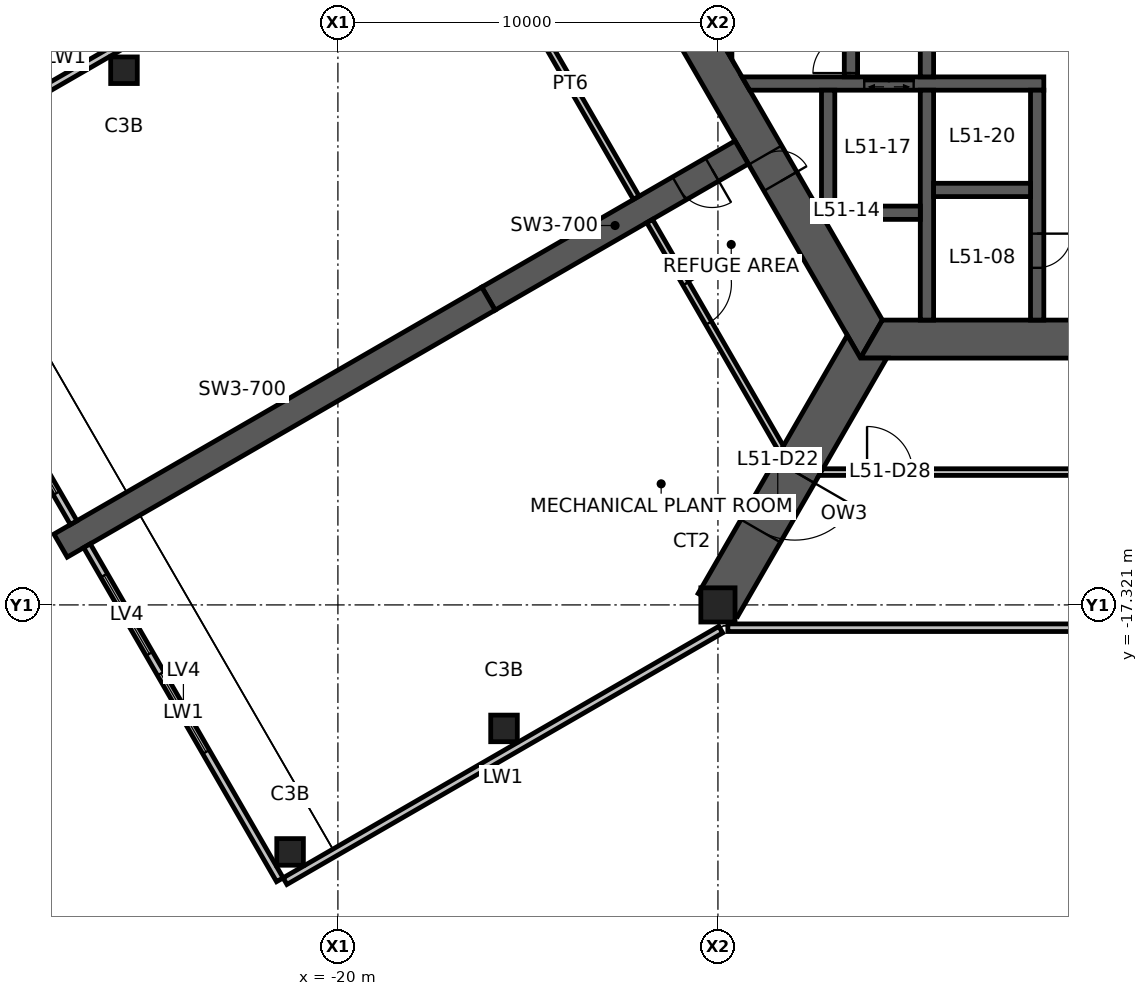
"""IFC4 building model, lengths in metres.
Left out: names, types, materials, properties, quantities, classifications, styles, units other than length and angle.
Written with IfcOpenShell. Run it as: python <this file> out.ifc"""

import sys

from ifc_helpers import new_model, si_unit, direction, frame, frame_2d, origin, origin_2d, place, context, subcontext, project, spatial, polyline, rectangle, hollow_rectangle, outline, extrude, element, fill, save


model = new_model("IFC4")
c1 = context("Model", 3, precision=1e-05, world=origin(), true_north=direction((0.0, 1.0)))
c2 = subcontext(c1, "Body", "Model", "MODEL_VIEW")
j1 = project(units=[si_unit("LENGTHUNIT", "METRE"), si_unit("PLANEANGLEUNIT", "RADIAN")], contexts=[c1])
p1 = place(None, origin())
s1 = spatial("IfcSite", under=j1, at=p1, CompositionType="ELEMENT")
p2 = place(p1, origin())
s2 = spatial("IfcBuilding", under=s1, at=p2, CompositionType="ELEMENT")
p3 = place(p2, frame((0.0, 0.0, 203.3)))
s3 = spatial("IfcBuildingStorey", under=s2, at=p3, CompositionType="ELEMENT", Elevation=203.3)
p4 = place(p3, frame((-10.0, -17.321, 0.0), z_axis=(0.0, 0.0, 1.0), x_axis=(1.0, 0.0, 0.0)))
e1 = element("IfcColumn", 1, at=p4, inside=s3, PredefinedType="COLUMN", context=c2, shape_type="SweptSolid", body=[
    extrude(hollow_rectangle(XDim=0.9, YDim=0.9, WallThickness=0.09, at=origin_2d()), origin(), (0.0, 0.0, 1.0), 5.0),
])
for number, where, z_axis, x_axis in (
    (2, (-25.629, -3.25, 0.0), (0.0, 0.0, 1.0), (1.0, 0.0, 0.0)),
    (3, (-15.629, -20.571, 0.0), (0.0, 0.0, 1.0), (1.0, 0.0, 0.0)),
    (4, (-21.258, -23.821, 0.0), (0.0, 0.0, 1.0), (1.0, 0.0, 0.0)),
):
    element("IfcColumn", number, at=place(p3, frame(where, z_axis=z_axis, x_axis=x_axis)), inside=s3, PredefinedType="COLUMN", context=c2, shape_type="SweptSolid", body=[
        extrude(hollow_rectangle(XDim=0.7, YDim=0.7, WallThickness=0.036, at=origin_2d()), origin(), (0.0, 0.0, 1.0), 5.0),
    ])
p5 = place(p3, frame((-11.922, 0.0, 0.0), z_axis=(0.0, 0.0, 1.0), x_axis=(0.500004296715, -0.866022923061, 0.0)))
e5 = element("IfcWall", 5, at=p5, inside=s3, PredefinedType="SHEAR", context=c2, shape_type="SweptSolid", body=[
    extrude(outline(polyline([(-0.289, -0.5), (6.331, -0.5), (7.131, -0.5), (12.211, -0.5), (11.634, 0.5), (7.131, 0.5), (6.331, 0.5), (0.289, 0.5), (-0.289, -0.5)])), origin(), (0.0, 0.0, 1.0), 5.0),
])
p6 = place(p5, frame((6.331, 0.0, 0.0)))
e6 = element("IfcOpeningElement", 6, at=p6, cuts=e5, PredefinedType="OPENING", context=c2, shape_type="SweptSolid", body=[
    extrude(rectangle(XDim=0.8, YDim=2.1, at=frame_2d((0.4, 1.05))), frame((0.0, 0.51, 0.0), z_axis=(0.0, -1.0, 0.0), x_axis=(1.0, 0.0, 0.0)), (0.0, 0.0, 1.0), 1.02),
])
p7 = place(p3, frame((-5.961, -10.325, 0.0), z_axis=(0.0, 0.0, 1.0), x_axis=(1.0, 0.0, 0.0)))
e7 = element("IfcWall", 7, at=p7, inside=s3, PredefinedType="SHEAR", context=c2, shape_type="SweptSolid", body=[
    extrude(outline(polyline([(-0.289, -0.5), (5.461, -0.5), (6.461, -0.5), (12.211, -0.5), (11.634, 0.5), (6.461, 0.5), (5.461, 0.5), (0.289, 0.5), (-0.289, -0.5)])), origin(), (0.0, 0.0, 1.0), 5.0),
])
p8 = place(p7, frame((5.461, 0.0, 0.0)))
e8 = element("IfcOpeningElement", 8, at=p8, cuts=e7, PredefinedType="OPENING", context=c2, shape_type="SweptSolid", body=[
    extrude(rectangle(XDim=1.0, YDim=2.1, at=frame_2d((0.5, 1.05))), frame((0.0, 0.51, 0.0), z_axis=(0.0, -1.0, 0.0), x_axis=(1.0, 0.0, 0.0)), (0.0, 0.0, 1.0), 1.02),
])
p9 = place(p3, frame((-9.375, -5.413, 0.0), z_axis=(0.0, 0.0, 1.0), x_axis=(-0.866032377459, -0.499987921047, 0.0)))
e9 = element("IfcWall", 9, at=p9, inside=s3, PredefinedType="SHEAR", context=c2, shape_type="SweptSolid", body=[
    extrude(rectangle(XDim=7.696, YDim=0.7, at=frame_2d((3.848, 0.0))), origin(), (0.0, 0.0, 1.0), 5.0),
])
p10 = place(p9, frame((0.9, 0.0, 0.0)))
e10 = element("IfcOpeningElement", 10, at=p10, cuts=e9, PredefinedType="OPENING", context=c2, shape_type="SweptSolid", body=[
    extrude(rectangle(XDim=1.0, YDim=2.1, at=frame_2d((0.5, 1.05))), frame((0.0, 0.36, 0.0), z_axis=(0.0, -1.0, 0.0), x_axis=(1.0, 0.0, 0.0)), (0.0, 0.0, 1.0), 0.72),
])
p11 = place(p3, frame((-16.039, -9.26, 0.0), z_axis=(0.0, 0.0, 1.0), x_axis=(-0.866024837091, -0.50000098154, 0.0)))
e11 = element("IfcWall", 11, at=p11, inside=s3, PredefinedType="SHEAR", context=c2, shape_type="SweptSolid", body=[
    extrude(rectangle(XDim=13.0, YDim=0.7, at=frame_2d((6.5, 0.0))), origin(), (0.0, 0.0, 1.0), 5.0),
])
p12 = place(p3, frame((-6.25, -10.825, -1.15), z_axis=(0.0, 0.0, 1.0), x_axis=(-0.50000045744, -0.866025139681, 0.0)))
e12 = element("IfcWall", 12, at=p12, inside=s3, PredefinedType="SHEAR", context=c2, shape_type="SweptSolid", body=[
    extrude(outline(polyline([(-0.346, -0.6), (3.453, -0.6), (5.253, -0.6), (7.5, -0.6), (7.5, 0.6), (5.253, 0.6), (3.453, 0.6), (-0.346, 0.6), (0.0, 0.0), (-0.346, -0.6)])), origin(), (0.0, 0.0, 1.0), 6.15),
])
p13 = place(p12, frame((3.453, 0.0, 1.15)))
e13 = element("IfcOpeningElement", 13, at=p13, cuts=e12, PredefinedType="OPENING", context=c2, shape_type="SweptSolid", body=[
    extrude(rectangle(XDim=1.8, YDim=2.4, at=frame_2d((0.9, 1.2))), frame((0.0, 0.61, 0.0), z_axis=(0.0, -1.0, 0.0), x_axis=(1.0, 0.0, 0.0)), (0.0, 0.0, 1.0), 1.22),
])
p14 = place(p3, frame((-9.739, -17.92, 0.0), z_axis=(0.0, 0.0, 1.0), x_axis=(1.0, 0.0, 0.0)))
e14 = element("IfcWall", 14, at=p14, inside=s3, PredefinedType="ELEMENTEDWALL", context=c2, shape_type="SweptSolid", body=[
    extrude(rectangle(XDim=19.479, YDim=0.2, at=frame_2d((9.739, 0.0))), origin(), (0.0, 0.0, 1.0), 5.0),
])
p15 = place(p3, frame((-20.526, 0.389, 0.0), z_axis=(0.0, 0.0, 1.0), x_axis=(-0.86602620781, -0.499998607384, 0.0)))
e15 = element("IfcWall", 15, at=p15, inside=s3, PredefinedType="ELEMENTEDWALL", context=c2, shape_type="SweptSolid", body=[
    extrude(rectangle(XDim=13.239, YDim=0.2, at=frame_2d((6.62, 0.0))), origin(), (0.0, 0.0, 1.0), 5.0),
])
p16 = place(p3, frame((-32.028, -6.367, 0.0), z_axis=(0.0, 0.0, 1.0), x_axis=(0.499991044257, -0.866030574324, 0.0)))
e16 = element("IfcWall", 16, at=p16, inside=s3, PredefinedType="ELEMENTEDWALL", context=c2, shape_type="SweptSolid", body=[
    extrude(rectangle(XDim=10.15, YDim=0.2, at=frame_2d((5.075, 0.0))), origin(), (0.0, 0.0, 1.0), 5.0),
])
p17 = place(p16, frame((3.883, 0.0, 0.6)))
e17 = element("IfcOpeningElement", 17, at=p17, cuts=e16, PredefinedType="OPENING", context=c2, shape_type="SweptSolid", body=[
    extrude(rectangle(XDim=2.383, YDim=3.6, at=frame_2d((1.192, 1.8))), frame((0.0, 0.11, 0.0), z_axis=(0.0, -1.0, 0.0), x_axis=(1.0, 0.0, 0.0)), (0.0, 0.0, 1.0), 0.22),
])
p18 = place(p16, frame((6.867, 0.0, 0.6)))
e18 = element("IfcOpeningElement", 18, at=p18, cuts=e16, PredefinedType="OPENING", context=c2, shape_type="SweptSolid", body=[
    extrude(rectangle(XDim=2.383, YDim=3.6, at=frame_2d((1.192, 1.8))), frame((0.0, 0.11, 0.0), z_axis=(0.0, -1.0, 0.0), x_axis=(1.0, 0.0, 0.0)), (0.0, 0.0, 1.0), 0.22),
])
p19 = place(p3, frame((-26.603, -15.763, 0.0), z_axis=(0.0, 0.0, 1.0), x_axis=(0.500019499409, -0.866014145503, 0.0)))
e19 = element("IfcWall", 19, at=p19, inside=s3, PredefinedType="ELEMENTEDWALL", context=c2, shape_type="SweptSolid", body=[
    extrude(rectangle(XDim=10.15, YDim=0.2, at=frame_2d((5.075, 0.0))), origin(), (0.0, 0.0, 1.0), 5.0),
])
p20 = place(p19, frame((0.9, 0.0, 0.6)))
e20 = element("IfcOpeningElement", 20, at=p20, cuts=e19, PredefinedType="OPENING", context=c2, shape_type="SweptSolid", body=[
    extrude(rectangle(XDim=2.383, YDim=3.6, at=frame_2d((1.192, 1.8))), frame((0.0, 0.11, 0.0), z_axis=(0.0, -1.0, 0.0), x_axis=(1.0, 0.0, 0.0)), (0.0, 0.0, 1.0), 0.22),
])
p21 = place(p19, frame((3.883, 0.0, 0.6)))
e21 = element("IfcOpeningElement", 21, at=p21, cuts=e19, PredefinedType="OPENING", context=c2, shape_type="SweptSolid", body=[
    extrude(rectangle(XDim=2.383, YDim=3.6, at=frame_2d((1.192, 1.8))), frame((0.0, 0.11, 0.0), z_axis=(0.0, -1.0, 0.0), x_axis=(1.0, 0.0, 0.0)), (0.0, 0.0, 1.0), 0.22),
])
p22 = place(p3, frame((-21.391, -24.59, 0.0), z_axis=(0.0, 0.0, 1.0), x_axis=(0.86602620781, 0.499998607384, 0.0)))
e22 = element("IfcWall", 22, at=p22, inside=s3, PredefinedType="ELEMENTEDWALL", context=c2, shape_type="SweptSolid", body=[
    extrude(rectangle(XDim=13.239, YDim=0.2, at=frame_2d((6.62, 0.0))), origin(), (0.0, 0.0, 1.0), 5.0),
])
p23 = place(p3, frame((-9.266, -3.6, 0.0), z_axis=(0.0, 0.0, 1.0), x_axis=(1.0, 0.0, 0.0)))
e23 = element("IfcWall", 23, at=p23, inside=s3, PredefinedType="SHEAR", context=c2, shape_type="SweptSolid", body=[
    extrude(outline(polyline([(0.101, -0.175), (3.116, -0.175), (4.417, -0.175), (7.841, -0.175), (7.841, 0.175), (4.417, 0.175), (3.116, 0.175), (-0.101, 0.175), (0.101, -0.175)])), origin(), (0.0, 0.0, 1.0), 5.0),
])
p24 = place(p23, frame((3.116, 0.0, 0.0)))
e24 = element("IfcOpeningElement", 24, at=p24, cuts=e23, PredefinedType="OPENING", context=c2, shape_type="SweptSolid", body=[
    extrude(rectangle(XDim=1.3, YDim=2.1, at=frame_2d((0.65, 1.05))), frame((0.0, 0.185, 0.0), z_axis=(0.0, -1.0, 0.0), x_axis=(1.0, 0.0, 0.0)), (0.0, 0.0, 1.0), 0.37),
])
p25 = place(p3, frame((-1.6, -3.775, 0.0), z_axis=(0.0, 0.0, 1.0), x_axis=(0.0, -1.0, 0.0)))
e25 = element("IfcWall", 25, at=p25, inside=s3, PredefinedType="SHEAR", context=c2, shape_type="SweptSolid", body=[
    extrude(rectangle(XDim=6.05, YDim=0.35, at=frame_2d((3.025, 0.0))), origin(), (0.0, 0.0, 1.0), 5.0),
])
p26 = place(p25, frame((3.775, 0.0, 0.0)))
e26 = element("IfcOpeningElement", 26, at=p26, cuts=e25, PredefinedType="OPENING", context=c2, shape_type="SweptSolid", body=[
    extrude(rectangle(XDim=0.9, YDim=2.1, at=frame_2d((0.45, 1.05))), frame((0.0, 0.185, 0.0), z_axis=(0.0, -1.0, 0.0), x_axis=(1.0, 0.0, 0.0)), (0.0, 0.0, 1.0), 0.37),
])
p27 = place(p3, frame((-4.5, -3.425, 0.0), z_axis=(0.0, 0.0, 1.0), x_axis=(0.0, 1.0, 0.0)))
e27 = element("IfcWall", 27, at=p27, inside=s3, PredefinedType="SHEAR", context=c2, shape_type="SweptSolid", body=[
    extrude(rectangle(XDim=6.85, YDim=0.35, at=frame_2d((3.425, 0.0))), origin(), (0.0, 0.0, 1.0), 5.0),
])
p28 = place(p27, frame((2.925, 0.0, 0.0)))
e28 = element("IfcOpeningElement", 28, at=p28, cuts=e27, PredefinedType="OPENING", context=c2, shape_type="SweptSolid", body=[
    extrude(rectangle(XDim=1.0, YDim=2.1, at=frame_2d((0.5, 1.05))), frame((0.0, 0.185, 0.0), z_axis=(0.0, -1.0, 0.0), x_axis=(1.0, 0.0, 0.0)), (0.0, 0.0, 1.0), 0.37),
])
p29 = place(p3, frame((-6.5, -3.425, 0.0), z_axis=(0.0, 0.0, 1.0), x_axis=(0.0, 1.0, 0.0)))
e29 = element("IfcWall", 29, at=p29, inside=s3, PredefinedType="SHEAR", context=c2, shape_type="SweptSolid", body=[
    extrude(rectangle(XDim=6.85, YDim=0.35, at=frame_2d((3.425, 0.0))), origin(), (0.0, 0.0, 1.0), 5.0),
])
p30 = place(p29, frame((0.1, 0.0, 0.0)))
e30 = element("IfcOpeningElement", 30, at=p30, cuts=e29, PredefinedType="OPENING", context=c2, shape_type="SweptSolid", body=[
    extrude(rectangle(XDim=1.0, YDim=2.1, at=frame_2d((0.5, 1.05))), frame((0.0, 0.185, 0.0), z_axis=(0.0, -1.0, 0.0), x_axis=(1.0, 0.0, 0.0)), (0.0, 0.0, 1.0), 0.37),
])
p31 = place(p3, frame((-4.5, -3.775, 0.0), z_axis=(0.0, 0.0, 1.0), x_axis=(0.0, -1.0, 0.0)))
e31 = element("IfcWall", 31, at=p31, inside=s3, PredefinedType="SHEAR", context=c2, shape_type="SweptSolid", body=[
    extrude(rectangle(XDim=6.05, YDim=0.35, at=frame_2d((3.025, 0.0))), origin(), (0.0, 0.0, 1.0), 5.0),
])
p32 = place(p3, frame((-4.325, -6.4, 0.0), z_axis=(0.0, 0.0, 1.0), x_axis=(1.0, 0.0, 0.0)))
e32 = element("IfcWall", 32, at=p32, inside=s3, PredefinedType="SHEAR", context=c2, shape_type="SweptSolid", body=[
    extrude(rectangle(XDim=2.55, YDim=0.35, at=frame_2d((1.275, 0.0))), origin(), (0.0, 0.0, 1.0), 5.0),
])
p33 = place(p3, frame((-6.925, -7.0, 0.0), z_axis=(0.0, 0.0, 1.0), x_axis=(1.0, 0.0, 0.0)))
e33 = element("IfcWall", 33, at=p33, inside=s3, PredefinedType="SHEAR", context=c2, shape_type="SweptSolid", body=[
    extrude(rectangle(XDim=2.25, YDim=0.35, at=frame_2d((1.125, 0.0))), origin(), (0.0, 0.0, 1.0), 5.0),
])
p34 = place(p3, frame((-7.1, -3.775, 0.0), z_axis=(0.0, 0.0, 1.0), x_axis=(0.0, -1.0, 0.0)))
e34 = element("IfcWall", 34, at=p34, inside=s3, PredefinedType="SHEAR", context=c2, shape_type="SweptSolid", body=[
    extrude(outline(polyline([(0.0, -0.175), (3.274, -0.175), (3.4, 0.0), (3.4, 0.175), (0.0, 0.175), (0.0, -0.175)])), origin(), (0.0, 0.0, 1.0), 5.0),
])
p35 = place(p3, frame((-9.808, -2.662, 0.0), z_axis=(0.0, 0.0, 1.0), x_axis=(0.0, 1.0, 0.0)))
e35 = element("IfcWall", 35, at=p35, inside=s3, PredefinedType="SHEAR", context=c2, shape_type="SweptSolid", body=[
    extrude(outline(polyline([(-0.303, -0.175), (5.628, -0.175), (5.021, 0.175), (0.303, 0.175), (-0.303, -0.175)])), origin(), (0.0, 0.0, 1.0), 5.0),
])
p36 = place(p3, frame((-15.617, -0.6, 0.0), z_axis=(0.0, 0.0, 1.0), x_axis=(0.499986605379, -0.866033137035, 0.0)))
e36 = element("IfcWall", 36, at=p36, inside=s3, PredefinedType="PARTITIONING", context=c2, shape_type="SweptSolid", body=[
    extrude(outline(polyline([(-0.051, -0.087), (6.934, -0.087), (6.934, 0.087), (0.051, 0.087), (-0.051, -0.087)])), origin(), (0.0, 0.0, 1.0), 4.8),
])
p37 = place(p3, frame((-11.795, -7.22, 0.0), z_axis=(0.0, 0.0, 1.0), x_axis=(0.49999776677, -0.866026693137, 0.0)))
e37 = element("IfcWall", 37, at=p37, inside=s3, PredefinedType="PARTITIONING", context=c2, shape_type="SweptSolid", body=[
    extrude(outline(polyline([(0.0, -0.087), (1.9, -0.087), (3.1, -0.087), (6.985, -0.087), (6.884, 0.087), (3.1, 0.087), (1.9, 0.087), (0.0, 0.087), (0.0, -0.087)])), origin(), (0.0, 0.0, 1.0), 4.8),
])
p38 = place(p37, frame((1.9, 0.0, 0.0)))
e38 = element("IfcOpeningElement", 38, at=p38, cuts=e37, PredefinedType="OPENING", context=c2, shape_type="SweptSolid", body=[
    extrude(rectangle(XDim=1.2, YDim=2.1, at=frame_2d((0.6, 1.05))), frame((0.0, 0.098, 0.0), z_axis=(0.0, -1.0, 0.0), x_axis=(1.0, 0.0, 0.0)), (0.0, 0.0, 1.0), 0.195),
])
p39 = place(p3, frame((-7.289, -13.825, 0.0), z_axis=(0.0, 0.0, 1.0), x_axis=(1.0, 0.0, 0.0)))
e39 = element("IfcWall", 39, at=p39, inside=s3, PredefinedType="PARTITIONING", context=c2, shape_type="SweptSolid", body=[
    extrude(outline(polyline([(-0.051, -0.087), (1.213, -0.087), (2.413, -0.087), (14.629, -0.087), (14.528, 0.087), (2.413, 0.087), (1.213, 0.087), (0.051, 0.087), (-0.051, -0.087)])), origin(), (0.0, 0.0, 1.0), 4.8),
])
p40 = place(p39, frame((1.213, 0.0, 0.0)))
e40 = element("IfcOpeningElement", 40, at=p40, cuts=e39, PredefinedType="OPENING", context=c2, shape_type="SweptSolid", body=[
    extrude(rectangle(XDim=1.2, YDim=2.1, at=frame_2d((0.6, 1.05))), frame((0.0, 0.098, 0.0), z_axis=(0.0, -1.0, 0.0), x_axis=(1.0, 0.0, 0.0)), (0.0, 0.0, 1.0), 0.195),
])
p41 = place(p18, origin())
e41 = element("IfcWindow", 41, at=p41, inside=s3, PartitioningType="SINGLE_PANEL", PredefinedType="USERDEFINED", context=c2, shape_type="SweptSolid", body=[
    extrude(rectangle(XDim=2.383, YDim=3.6, at=frame_2d((1.192, 1.8))), frame((0.0, 0.03, 0.0), z_axis=(0.0, -1.0, 0.0), x_axis=(1.0, 0.0, 0.0)), (0.0, 0.0, 1.0), 0.06),
])
fill(e18, e41)
p42 = place(p20, origin())
e42 = element("IfcWindow", 42, at=p42, inside=s3, PartitioningType="SINGLE_PANEL", PredefinedType="USERDEFINED", context=c2, shape_type="SweptSolid", body=[
    extrude(rectangle(XDim=2.383, YDim=3.6, at=frame_2d((1.192, 1.8))), frame((0.0, 0.03, 0.0), z_axis=(0.0, -1.0, 0.0), x_axis=(1.0, 0.0, 0.0)), (0.0, 0.0, 1.0), 0.06),
])
fill(e20, e42)
p43 = place(p21, origin())
e43 = element("IfcWindow", 43, at=p43, inside=s3, PartitioningType="SINGLE_PANEL", PredefinedType="USERDEFINED", context=c2, shape_type="SweptSolid", body=[
    extrude(rectangle(XDim=2.383, YDim=3.6, at=frame_2d((1.192, 1.8))), frame((0.0, 0.03, 0.0), z_axis=(0.0, -1.0, 0.0), x_axis=(1.0, 0.0, 0.0)), (0.0, 0.0, 1.0), 0.06),
])
fill(e21, e43)
p44 = place(p6, origin())
e44 = element("IfcDoor", 44, at=p44, inside=s3, OperationType="SINGLE_SWING_RIGHT", PredefinedType="DOOR", context=c2, shape_type="SweptSolid", body=[
    extrude(rectangle(XDim=0.8, YDim=2.1, at=frame_2d((0.4, 1.05))), frame((0.0, 0.025, 0.0), z_axis=(0.0, -1.0, 0.0), x_axis=(1.0, 0.0, 0.0)), (0.0, 0.0, 1.0), 0.05),
])
fill(e6, e44)
p45 = place(p30, origin())
e45 = element("IfcDoor", 45, at=p45, inside=s3, OperationType="SINGLE_SWING_LEFT", PredefinedType="DOOR", context=c2, shape_type="SweptSolid", body=[
    extrude(rectangle(XDim=1.0, YDim=2.1, at=frame_2d((0.5, 1.05))), frame((0.0, 0.025, 0.0), z_axis=(0.0, -1.0, 0.0), x_axis=(1.0, 0.0, 0.0)), (0.0, 0.0, 1.0), 0.05),
])
fill(e30, e45)
p46 = place(p26, origin())
e46 = element("IfcDoor", 46, at=p46, inside=s3, OperationType="SINGLE_SWING_LEFT", PredefinedType="DOOR", context=c2, shape_type="SweptSolid", body=[
    extrude(rectangle(XDim=0.9, YDim=2.1, at=frame_2d((0.45, 1.05))), frame((0.0, 0.025, 0.0), z_axis=(0.0, -1.0, 0.0), x_axis=(1.0, 0.0, 0.0)), (0.0, 0.0, 1.0), 0.05),
])
fill(e26, e46)
p47 = place(p10, origin())
e47 = element("IfcDoor", 47, at=p47, inside=s3, OperationType="SINGLE_SWING_LEFT", PredefinedType="DOOR", context=c2, shape_type="SweptSolid", body=[
    extrude(rectangle(XDim=1.0, YDim=2.1, at=frame_2d((0.5, 1.05))), frame((0.0, 0.025, 0.0), z_axis=(0.0, -1.0, 0.0), x_axis=(1.0, 0.0, 0.0)), (0.0, 0.0, 1.0), 0.05),
])
fill(e10, e47)
p48 = place(p13, origin())
e48 = element("IfcDoor", 48, at=p48, inside=s3, OperationType="DOUBLE_DOOR_SINGLE_SWING", PredefinedType="DOOR", context=c2, shape_type="SweptSolid", body=[
    extrude(rectangle(XDim=1.8, YDim=2.4, at=frame_2d((0.9, 1.2))), frame((0.0, 0.025, 0.0), z_axis=(0.0, -1.0, 0.0), x_axis=(1.0, 0.0, 0.0)), (0.0, 0.0, 1.0), 0.05),
])
fill(e13, e48)
p49 = place(p38, origin())
e49 = element("IfcDoor", 49, at=p49, inside=s3, OperationType="DOUBLE_DOOR_SINGLE_SWING", PredefinedType="DOOR", context=c2, shape_type="SweptSolid", body=[
    extrude(rectangle(XDim=1.2, YDim=2.1, at=frame_2d((0.6, 1.05))), frame((0.0, 0.025, 0.0), z_axis=(0.0, -1.0, 0.0), x_axis=(1.0, 0.0, 0.0)), (0.0, 0.0, 1.0), 0.05),
])
fill(e38, e49)
p50 = place(p40, origin())
e50 = element("IfcDoor", 50, at=p50, inside=s3, OperationType="DOUBLE_DOOR_SINGLE_SWING", PredefinedType="DOOR", context=c2, shape_type="SweptSolid", body=[
    extrude(rectangle(XDim=1.2, YDim=2.1, at=frame_2d((0.6, 1.05))), frame((0.0, 0.025, 0.0), z_axis=(0.0, -1.0, 0.0), x_axis=(1.0, 0.0, 0.0)), (0.0, 0.0, 1.0), 0.05),
])
fill(e40, e50)
p51 = place(p24, origin())
e51 = element("IfcDoor", 51, at=p51, inside=s3, OperationType="DOUBLE_DOOR_SLIDING", PredefinedType="DOOR", context=c2, shape_type="SweptSolid", body=[
    extrude(rectangle(XDim=1.3, YDim=2.1, at=frame_2d((0.65, 1.05))), frame((0.0, 0.025, 0.0), z_axis=(0.0, -1.0, 0.0), x_axis=(1.0, 0.0, 0.0)), (0.0, 0.0, 1.0), 0.05),
])
fill(e24, e51)
save(model, sys.argv[1])
